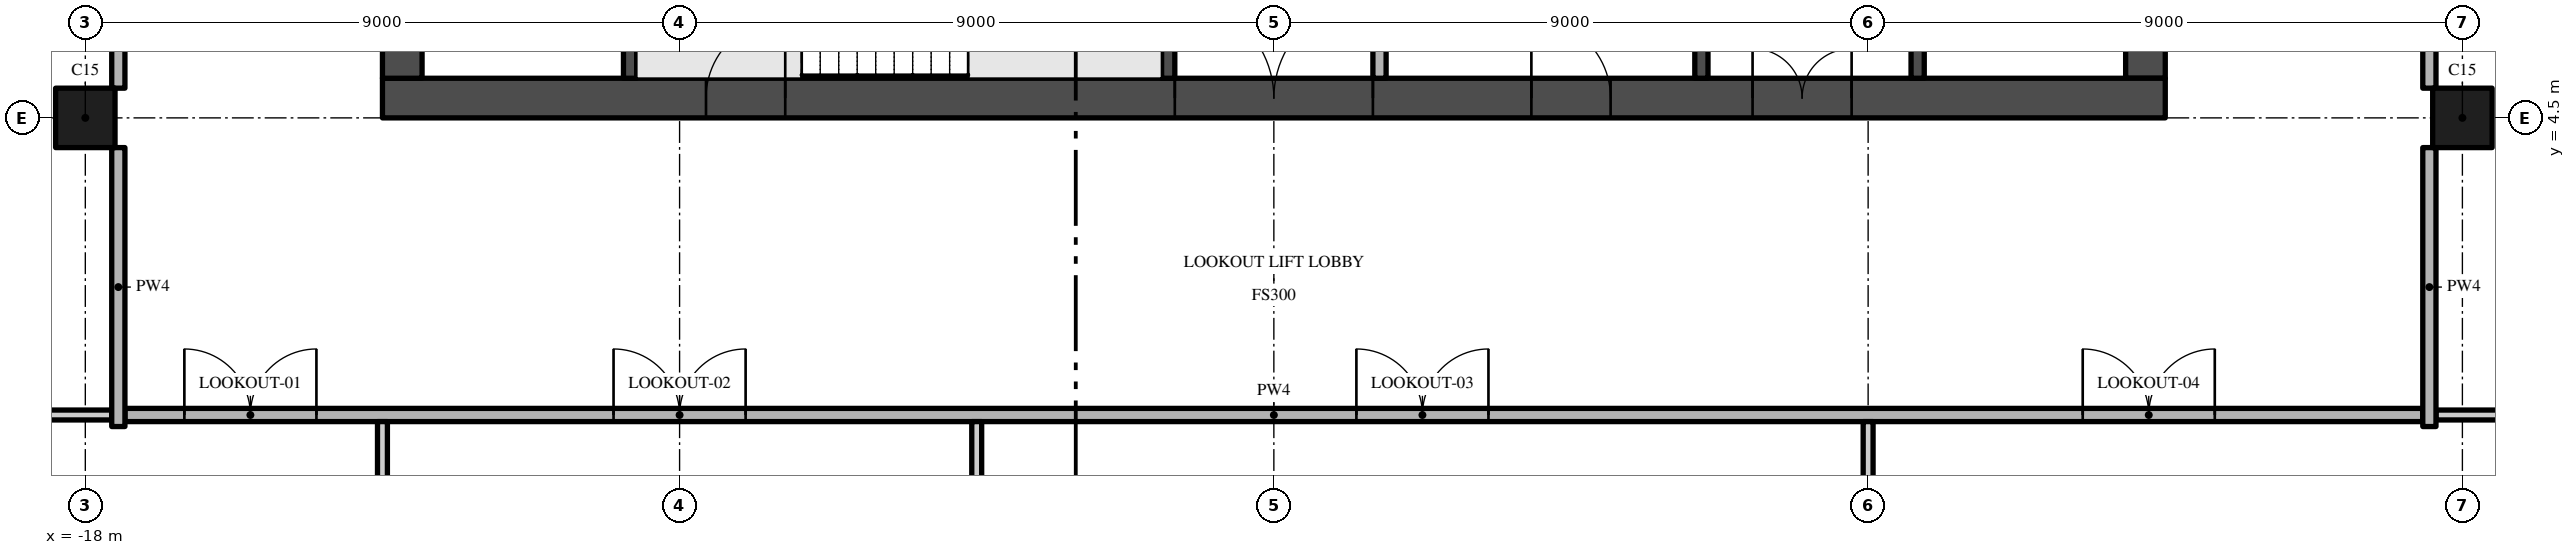
"""IFC4 building model, lengths in metres.
Left out: names, types, materials, properties, quantities, classifications, styles, units other than length and angle.
Written with IfcOpenShell. Run it as: python <this file> out.ifc"""

import sys

from ifc_helpers import new_model, si_unit, direction, frame, frame_2d, origin, origin_2d, place, context, subcontext, project, spatial, rectangle, extrude, element, fill, save


model = new_model("IFC4")
c1 = context("Model", 3, precision=1e-05, world=origin(), true_north=direction((0.0, 1.0)))
c2 = subcontext(c1, "Body", "Model", "MODEL_VIEW")
j1 = project(units=[si_unit("LENGTHUNIT", "METRE"), si_unit("PLANEANGLEUNIT", "RADIAN")], contexts=[c1])
p1 = place(None, origin())
s1 = spatial("IfcSite", under=j1, at=p1, CompositionType="ELEMENT")
p2 = place(p1, origin())
s2 = spatial("IfcBuilding", under=s1, at=p2, CompositionType="ELEMENT")
p3 = place(p2, frame((0.0, 0.0, 297.4)))
s3 = spatial("IfcBuildingStorey", under=s2, at=p3, CompositionType="ELEMENT", Elevation=297.4)
p4 = place(p3, frame((-13.5, 4.8, -0.3), z_axis=(0.0, 0.0, 1.0), x_axis=(1.0, 0.0, 0.0)))
e1 = element("IfcWall", 1, at=p4, inside=s3, PredefinedType="SHEAR", context=c2, shape_type="SweptSolid", body=[
    extrude(rectangle(XDim=27.0, YDim=0.6, at=frame_2d((13.5, 0.0))), origin(), (0.0, 0.0, 1.0), 5.95),
])
p5 = place(p4, frame((12.0, 0.0, 0.3)))
e2 = element("IfcOpeningElement", 2, at=p5, cuts=e1, PredefinedType="OPENING", context=c2, shape_type="SweptSolid", body=[
    extrude(rectangle(XDim=3.0, YDim=2.4, at=frame_2d((1.5, 1.2))), frame((0.0, 0.31, 0.0), z_axis=(0.0, -1.0, 0.0), x_axis=(1.0, 0.0, 0.0)), (0.0, 0.0, 1.0), 0.62),
])
p6 = place(p4, frame((4.9, 0.0, 0.3)))
e3 = element("IfcOpeningElement", 3, at=p6, cuts=e1, PredefinedType="OPENING", context=c2, shape_type="SweptSolid", body=[
    extrude(rectangle(XDim=1.2, YDim=2.2, at=frame_2d((0.6, 1.1))), frame((0.0, 0.31, 0.0), z_axis=(0.0, -1.0, 0.0), x_axis=(1.0, 0.0, 0.0)), (0.0, 0.0, 1.0), 0.62),
])
p7 = place(p4, frame((20.75, 0.0, 0.3)))
e4 = element("IfcOpeningElement", 4, at=p7, cuts=e1, PredefinedType="OPENING", context=c2, shape_type="SweptSolid", body=[
    extrude(rectangle(XDim=1.5, YDim=2.2, at=frame_2d((0.75, 1.1))), frame((0.0, 0.31, 0.0), z_axis=(0.0, -1.0, 0.0), x_axis=(1.0, 0.0, 0.0)), (0.0, 0.0, 1.0), 0.62),
])
p8 = place(p4, frame((17.4, 0.0, 0.3)))
e5 = element("IfcOpeningElement", 5, at=p8, cuts=e1, PredefinedType="OPENING", context=c2, shape_type="SweptSolid", body=[
    extrude(rectangle(XDim=1.2, YDim=2.2, at=frame_2d((0.6, 1.1))), frame((0.0, 0.31, 0.0), z_axis=(0.0, -1.0, 0.0), x_axis=(1.0, 0.0, 0.0)), (0.0, 0.0, 1.0), 0.62),
])
p9 = place(p3, frame((13.2, 5.1, -0.3), z_axis=(0.0, 0.0, 1.0), x_axis=(0.0, 1.0, 0.0)))
e6 = element("IfcWall", 6, at=p9, inside=s3, PredefinedType="SHEAR", context=c2, shape_type="SweptSolid", body=[
    extrude(rectangle(XDim=16.8, YDim=0.6, at=frame_2d((8.4, 0.0))), origin(), (0.0, 0.0, 1.0), 5.95),
])
p10 = place(p9, frame((6.3, 0.0, 0.3)))
e7 = element("IfcOpeningElement", 7, at=p10, cuts=e6, PredefinedType="OPENING", context=c2, shape_type="SweptSolid", body=[
    extrude(rectangle(XDim=1.2, YDim=2.2, at=frame_2d((0.6, 1.1))), frame((0.0, 0.31, 0.0), z_axis=(0.0, -1.0, 0.0), x_axis=(1.0, 0.0, 0.0)), (0.0, 0.0, 1.0), 0.62),
])
p11 = place(p3, frame((-13.2, 21.9, -0.3), z_axis=(0.0, 0.0, 1.0), x_axis=(0.0, -1.0, 0.0)))
e8 = element("IfcWall", 8, at=p11, inside=s3, PredefinedType="SHEAR", context=c2, shape_type="SweptSolid", body=[
    extrude(rectangle(XDim=16.8, YDim=0.6, at=frame_2d((8.4, 0.0))), origin(), (0.0, 0.0, 1.0), 5.95),
])
p12 = place(p11, frame((9.3, 0.0, 0.3)))
e9 = element("IfcOpeningElement", 9, at=p12, cuts=e8, PredefinedType="OPENING", context=c2, shape_type="SweptSolid", body=[
    extrude(rectangle(XDim=1.2, YDim=2.2, at=frame_2d((0.6, 1.1))), frame((0.0, 0.31, 0.0), z_axis=(0.0, -1.0, 0.0), x_axis=(1.0, 0.0, 0.0)), (0.0, 0.0, 1.0), 0.62),
])
for number, where, z_axis, x_axis in (
    (10, (-18.0, 4.5, 0.0), (0.0, 0.0, 1.0), (1.0, 0.0, 0.0)),
    (11, (18.0, 4.5, 0.0), (0.0, 0.0, 1.0), (1.0, 0.0, 0.0)),
):
    element("IfcColumn", number, at=place(p3, frame(where, z_axis=z_axis, x_axis=x_axis)), inside=s3, PredefinedType="COLUMN", context=c2, shape_type="SweptSolid", body=[
        extrude(rectangle(XDim=0.9, YDim=0.9, at=origin_2d()), origin(), (0.0, 0.0, 1.0), 5.65),
    ])
for number, where, z_axis, x_axis in (
    (12, (-9.75, 5.1, 0.0), (0.0, 0.0, 1.0), (0.0, 1.0, 0.0)),
    (13, (-1.6, 5.1, 0.0), (0.0, 0.0, 1.0), (0.0, 1.0, 0.0)),
):
    element("IfcWall", number, at=place(p3, frame(where, z_axis=z_axis, x_axis=x_axis)), inside=s3, PredefinedType="SHEAR", context=c2, shape_type="SweptSolid", body=[
        extrude(rectangle(XDim=2.85, YDim=0.2, at=frame_2d((1.425, 0.0))), origin(), (0.0, 0.0, 1.0), 5.65),
    ])
p13 = place(p3, frame((1.6, 7.5, 0.0), z_axis=(0.0, 0.0, 1.0), x_axis=(0.0, -1.0, 0.0)))
e14 = element("IfcWall", 14, at=p13, inside=s3, PredefinedType="PARTITIONING", context=c2, shape_type="SweptSolid", body=[
    extrude(rectangle(XDim=2.4, YDim=0.2, at=frame_2d((1.2, 0.0))), origin(), (0.0, 0.0, 1.0), 5.65),
])
p14 = place(p13, frame((0.35, 0.0, 0.0)))
e15 = element("IfcOpeningElement", 15, at=p14, cuts=e14, PredefinedType="OPENING", context=c2, shape_type="SweptSolid", body=[
    extrude(rectangle(XDim=0.9, YDim=2.1, at=frame_2d((0.45, 1.05))), frame((0.0, 0.11, 0.0), z_axis=(0.0, -1.0, 0.0), x_axis=(1.0, 0.0, 0.0)), (0.0, 0.0, 1.0), 0.22),
])
p15 = place(p3, frame((6.475, 5.1, 0.0), z_axis=(0.0, 0.0, 1.0), x_axis=(0.0, 1.0, 0.0)))
e16 = element("IfcWall", 16, at=p15, inside=s3, PredefinedType="SHEAR", context=c2, shape_type="SweptSolid", body=[
    extrude(rectangle(XDim=2.4, YDim=0.2, at=frame_2d((1.2, 0.0))), origin(), (0.0, 0.0, 1.0), 5.65),
])
p16 = place(p3, frame((9.75, 5.1, 0.0), z_axis=(0.0, 0.0, 1.0), x_axis=(0.0, 1.0, 0.0)))
e17 = element("IfcWall", 17, at=p16, inside=s3, PredefinedType="SHEAR", context=c2, shape_type="SweptSolid", body=[
    extrude(rectangle(XDim=2.5, YDim=0.2, at=frame_2d((1.25, 0.0))), origin(), (0.0, 0.0, 1.0), 5.65),
])
p17 = place(p16, frame((0.85, 0.0, 0.0)))
e18 = element("IfcOpeningElement", 18, at=p17, cuts=e17, PredefinedType="OPENING", context=c2, shape_type="SweptSolid", body=[
    extrude(rectangle(XDim=1.1, YDim=2.1, at=frame_2d((0.55, 1.05))), frame((0.0, 0.11, 0.0), z_axis=(0.0, -1.0, 0.0), x_axis=(1.0, 0.0, 0.0)), (0.0, 0.0, 1.0), 0.22),
])
p18 = place(p3, frame((-17.4, 0.0, 0.0), z_axis=(0.0, 0.0, 1.0), x_axis=(1.0, 0.0, 0.0)))
e19 = element("IfcWall", 19, at=p18, inside=s3, PredefinedType="PARTITIONING", context=c2, shape_type="SweptSolid", body=[
    extrude(rectangle(XDim=34.8, YDim=0.2, at=frame_2d((17.4, 0.0))), origin(), (0.0, 0.0, 1.0), 5.65),
])
p19 = place(p18, frame((0.9, 0.0, 0.0)))
e20 = element("IfcOpeningElement", 20, at=p19, cuts=e19, PredefinedType="OPENING", context=c2, shape_type="SweptSolid", body=[
    extrude(rectangle(XDim=2.0, YDim=2.4, at=frame_2d((1.0, 1.2))), frame((0.0, 0.11, 0.0), z_axis=(0.0, -1.0, 0.0), x_axis=(1.0, 0.0, 0.0)), (0.0, 0.0, 1.0), 0.22),
])
p20 = place(p18, frame((7.4, 0.0, 0.0)))
e21 = element("IfcOpeningElement", 21, at=p20, cuts=e19, PredefinedType="OPENING", context=c2, shape_type="SweptSolid", body=[
    extrude(rectangle(XDim=2.0, YDim=2.4, at=frame_2d((1.0, 1.2))), frame((0.0, 0.11, 0.0), z_axis=(0.0, -1.0, 0.0), x_axis=(1.0, 0.0, 0.0)), (0.0, 0.0, 1.0), 0.22),
])
p21 = place(p18, frame((18.65, 0.0, 0.0)))
e22 = element("IfcOpeningElement", 22, at=p21, cuts=e19, PredefinedType="OPENING", context=c2, shape_type="SweptSolid", body=[
    extrude(rectangle(XDim=2.0, YDim=2.4, at=frame_2d((1.0, 1.2))), frame((0.0, 0.11, 0.0), z_axis=(0.0, -1.0, 0.0), x_axis=(1.0, 0.0, 0.0)), (0.0, 0.0, 1.0), 0.22),
])
p22 = place(p18, frame((29.65, 0.0, 0.0)))
e23 = element("IfcOpeningElement", 23, at=p22, cuts=e19, PredefinedType="OPENING", context=c2, shape_type="SweptSolid", body=[
    extrude(rectangle(XDim=2.0, YDim=2.4, at=frame_2d((1.0, 1.2))), frame((0.0, 0.11, 0.0), z_axis=(0.0, -1.0, 0.0), x_axis=(1.0, 0.0, 0.0)), (0.0, 0.0, 1.0), 0.22),
])
for number, where, z_axis, x_axis in (
    (24, (-22.2, 0.0, 0.0), (0.0, 0.0, 1.0), (1.0, 0.0, 0.0)),
    (25, (17.6, 0.0, 0.0), (0.0, 0.0, 1.0), (1.0, 0.0, 0.0)),
):
    element("IfcWall", number, at=place(p3, frame(where, z_axis=z_axis, x_axis=x_axis)), inside=s3, PredefinedType="PARTITIONING", context=c2, shape_type="SweptSolid", body=[
        extrude(rectangle(XDim=4.6, YDim=0.15, at=frame_2d((2.3, 0.0))), origin(), (0.0, 0.0, 1.0), 5.65),
    ])
p23 = place(p3, frame((-17.5, -0.175, 0.0), z_axis=(0.0, 0.0, 1.0), x_axis=(0.0, 1.0, 0.0)))
e26 = element("IfcWall", 26, at=p23, inside=s3, PredefinedType="PARTITIONING", context=c2, shape_type="SweptSolid", body=[
    extrude(rectangle(XDim=4.225, YDim=0.2, at=frame_2d((2.112, 0.0))), origin(), (0.0, 0.0, 1.0), 5.65),
])
p24 = place(p3, frame((-17.5, 13.05, 0.0), z_axis=(0.0, 0.0, 1.0), x_axis=(0.0, -1.0, 0.0)))
e27 = element("IfcWall", 27, at=p24, inside=s3, PredefinedType="PARTITIONING", context=c2, shape_type="SweptSolid", body=[
    extrude(rectangle(XDim=8.1, YDim=0.2, at=frame_2d((4.05, 0.0))), origin(), (0.0, 0.0, 1.0), 5.65),
])
p25 = place(p24, frame((0.15, 0.0, 0.0)))
e28 = element("IfcOpeningElement", 28, at=p25, cuts=e27, PredefinedType="OPENING", context=c2, shape_type="SweptSolid", body=[
    extrude(rectangle(XDim=1.8, YDim=2.4, at=frame_2d((0.9, 1.2))), frame((0.0, 0.11, 0.0), z_axis=(0.0, -1.0, 0.0), x_axis=(1.0, 0.0, 0.0)), (0.0, 0.0, 1.0), 0.22),
])
for number, where, z_axis, x_axis in (
    (29, (-13.5, -17.7, 0.0), (0.0, 0.0, 1.0), (0.0, 1.0, 0.0)),
    (30, (-4.5, -17.7, 0.0), (0.0, 0.0, 1.0), (0.0, 1.0, 0.0)),
):
    element("IfcWall", number, at=place(p3, frame(where, z_axis=z_axis, x_axis=x_axis)), inside=s3, PredefinedType="PARTITIONING", context=c2, shape_type="SweptSolid", body=[
        extrude(rectangle(XDim=17.6, YDim=0.15, at=frame_2d((8.8, 0.0))), origin(), (0.0, 0.0, 1.0), 5.65),
    ])
p26 = place(p3, frame((9.0, -4.05, 0.0), z_axis=(0.0, 0.0, 1.0), x_axis=(0.0, 1.0, 0.0)))
e31 = element("IfcWall", 31, at=p26, inside=s3, PredefinedType="PARTITIONING", context=c2, shape_type="SweptSolid", body=[
    extrude(rectangle(XDim=3.95, YDim=0.15, at=frame_2d((1.975, 0.0))), origin(), (0.0, 0.0, 1.0), 5.65),
])
p27 = place(p3, frame((17.5, -0.175, 0.0), z_axis=(0.0, 0.0, 1.0), x_axis=(0.0, 1.0, 0.0)))
e32 = element("IfcWall", 32, at=p27, inside=s3, PredefinedType="PARTITIONING", context=c2, shape_type="SweptSolid", body=[
    extrude(rectangle(XDim=4.225, YDim=0.2, at=frame_2d((2.112, 0.0))), origin(), (0.0, 0.0, 1.0), 5.65),
])
p28 = place(p3, frame((17.5, 4.95, 0.0), z_axis=(0.0, 0.0, 1.0), x_axis=(0.0, 1.0, 0.0)))
e33 = element("IfcWall", 33, at=p28, inside=s3, PredefinedType="PARTITIONING", context=c2, shape_type="SweptSolid", body=[
    extrude(rectangle(XDim=8.1, YDim=0.2, at=frame_2d((4.05, 0.0))), origin(), (0.0, 0.0, 1.0), 5.65),
])
p29 = place(p28, frame((6.15, 0.0, 0.0)))
e34 = element("IfcOpeningElement", 34, at=p29, cuts=e33, PredefinedType="OPENING", context=c2, shape_type="SweptSolid", body=[
    extrude(rectangle(XDim=1.8, YDim=2.4, at=frame_2d((0.9, 1.2))), frame((0.0, 0.11, 0.0), z_axis=(0.0, -1.0, 0.0), x_axis=(1.0, 0.0, 0.0)), (0.0, 0.0, 1.0), 0.22),
])
p30 = place(p5, frame((3.0, 0.0, 0.0), z_axis=(0.0, 0.0, 1.0), x_axis=(-1.0, 0.0, 0.0)))
e35 = element("IfcDoor", 35, at=p30, inside=s3, OperationType="DOUBLE_DOOR_SINGLE_SWING", PredefinedType="DOOR", context=c2, shape_type="SweptSolid", body=[
    extrude(rectangle(XDim=3.0, YDim=2.4, at=frame_2d((1.5, 1.2))), frame((0.0, 0.025, 0.0), z_axis=(0.0, -1.0, 0.0), x_axis=(1.0, 0.0, 0.0)), (0.0, 0.0, 1.0), 0.05),
])
fill(e2, e35)
p31 = place(p6, frame((1.2, 0.0, 0.0), z_axis=(0.0, 0.0, 1.0), x_axis=(-1.0, 0.0, 0.0)))
e36 = element("IfcDoor", 36, at=p31, inside=s3, OperationType="SINGLE_SWING_LEFT", PredefinedType="DOOR", context=c2, shape_type="SweptSolid", body=[
    extrude(rectangle(XDim=1.2, YDim=2.2, at=frame_2d((0.6, 1.1))), frame((0.0, 0.025, 0.0), z_axis=(0.0, -1.0, 0.0), x_axis=(1.0, 0.0, 0.0)), (0.0, 0.0, 1.0), 0.05),
])
fill(e3, e36)
p32 = place(p7, frame((1.5, 0.0, 0.0), z_axis=(0.0, 0.0, 1.0), x_axis=(-1.0, 0.0, 0.0)))
e37 = element("IfcDoor", 37, at=p32, inside=s3, OperationType="DOUBLE_DOOR_SINGLE_SWING", PredefinedType="DOOR", context=c2, shape_type="SweptSolid", body=[
    extrude(rectangle(XDim=1.5, YDim=2.2, at=frame_2d((0.75, 1.1))), frame((0.0, 0.025, 0.0), z_axis=(0.0, -1.0, 0.0), x_axis=(1.0, 0.0, 0.0)), (0.0, 0.0, 1.0), 0.05),
])
fill(e4, e37)
p33 = place(p8, frame((1.2, 0.0, 0.0), z_axis=(0.0, 0.0, 1.0), x_axis=(-1.0, 0.0, 0.0)))
e38 = element("IfcDoor", 38, at=p33, inside=s3, OperationType="SINGLE_SWING_RIGHT", PredefinedType="DOOR", context=c2, shape_type="SweptSolid", body=[
    extrude(rectangle(XDim=1.2, YDim=2.2, at=frame_2d((0.6, 1.1))), frame((0.0, 0.025, 0.0), z_axis=(0.0, -1.0, 0.0), x_axis=(1.0, 0.0, 0.0)), (0.0, 0.0, 1.0), 0.05),
])
fill(e5, e38)
p34 = place(p19, origin())
e39 = element("IfcDoor", 39, at=p34, inside=s3, OperationType="DOUBLE_DOOR_SINGLE_SWING", PredefinedType="DOOR", context=c2, shape_type="SweptSolid", body=[
    extrude(rectangle(XDim=2.0, YDim=2.4, at=frame_2d((1.0, 1.2))), frame((0.0, 0.025, 0.0), z_axis=(0.0, -1.0, 0.0), x_axis=(1.0, 0.0, 0.0)), (0.0, 0.0, 1.0), 0.05),
])
fill(e20, e39)
p35 = place(p20, origin())
e40 = element("IfcDoor", 40, at=p35, inside=s3, OperationType="DOUBLE_DOOR_SINGLE_SWING", PredefinedType="DOOR", context=c2, shape_type="SweptSolid", body=[
    extrude(rectangle(XDim=2.0, YDim=2.4, at=frame_2d((1.0, 1.2))), frame((0.0, 0.025, 0.0), z_axis=(0.0, -1.0, 0.0), x_axis=(1.0, 0.0, 0.0)), (0.0, 0.0, 1.0), 0.05),
])
fill(e21, e40)
p36 = place(p21, origin())
e41 = element("IfcDoor", 41, at=p36, inside=s3, OperationType="DOUBLE_DOOR_SINGLE_SWING", PredefinedType="DOOR", context=c2, shape_type="SweptSolid", body=[
    extrude(rectangle(XDim=2.0, YDim=2.4, at=frame_2d((1.0, 1.2))), frame((0.0, 0.025, 0.0), z_axis=(0.0, -1.0, 0.0), x_axis=(1.0, 0.0, 0.0)), (0.0, 0.0, 1.0), 0.05),
])
fill(e22, e41)
p37 = place(p22, origin())
e42 = element("IfcDoor", 42, at=p37, inside=s3, OperationType="DOUBLE_DOOR_SINGLE_SWING", PredefinedType="DOOR", context=c2, shape_type="SweptSolid", body=[
    extrude(rectangle(XDim=2.0, YDim=2.4, at=frame_2d((1.0, 1.2))), frame((0.0, 0.025, 0.0), z_axis=(0.0, -1.0, 0.0), x_axis=(1.0, 0.0, 0.0)), (0.0, 0.0, 1.0), 0.05),
])
fill(e23, e42)
save(model, sys.argv[1])
